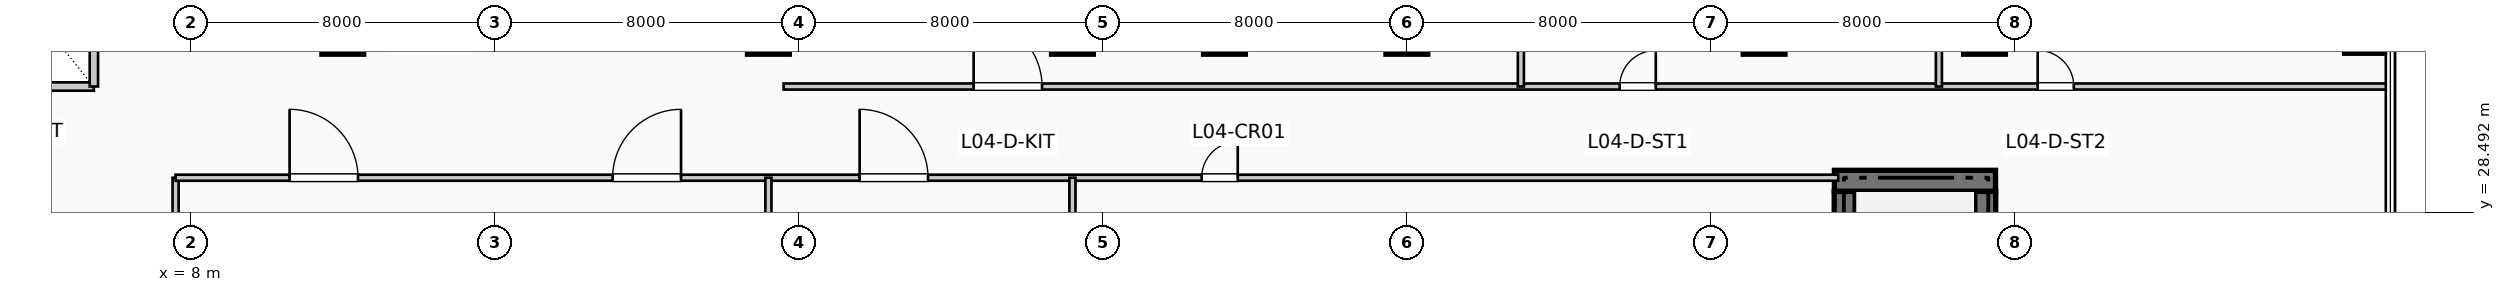
"""IFC4 building model, lengths in metres.
Left out: names, types, materials, properties, quantities, classifications, styles, units other than length and angle.
Written with IfcOpenShell. Run it as: python <this file> out.ifc"""

import sys

from ifc_helpers import new_model, si_unit, direction, frame, frame_2d, origin, origin_2d, place, context, subcontext, project, spatial, rectangle, extrude, element, fill, save


model = new_model("IFC4")
c1 = context("Model", 3, precision=1e-05, world=origin(), true_north=direction((0.0, 1.0)))
c2 = subcontext(c1, "Body", "Model", "MODEL_VIEW")
j1 = project(units=[si_unit("LENGTHUNIT", "METRE"), si_unit("PLANEANGLEUNIT", "RADIAN")], contexts=[c1])
p1 = place(None, origin())
s1 = spatial("IfcSite", under=j1, at=p1, CompositionType="ELEMENT")
p2 = place(p1, origin())
s2 = spatial("IfcBuilding", under=s1, at=p2, CompositionType="ELEMENT")
p3 = place(p2, frame((0.0, 0.0, 21.12)))
s3 = spatial("IfcBuildingStorey", under=s2, at=p3, CompositionType="ELEMENT", Elevation=21.12)
for number, where, z_axis, x_axis in (
    (1, (51.52, 21.15, 0.0), (0.0, 0.0, 1.0), (0.0, 1.0, 0.0)),
    (2, (55.22, 21.15, 0.0), (0.0, 0.0, 1.0), (0.0, 1.0, 0.0)),
):
    element("IfcWall", number, at=place(p3, frame(where, z_axis=z_axis, x_axis=x_axis)), inside=s3, PredefinedType="SHEAR", context=c2, shape_type="SweptSolid", body=[
        extrude(rectangle(XDim=7.89, YDim=0.55, at=frame_2d((3.945, 0.0))), origin(), (0.0, 0.0, 1.0), 4.62),
    ])
p4 = place(p3, frame((51.25, 29.32, 0.0), z_axis=(0.0, 0.0, 1.0), x_axis=(1.0, 0.0, 0.0)))
e3 = element("IfcWall", 3, at=p4, inside=s3, PredefinedType="SHEAR", context=c2, shape_type="SweptSolid", body=[
    extrude(rectangle(XDim=4.24, YDim=0.55, at=frame_2d((2.12, 0.0))), origin(), (0.0, 0.0, 1.0), 4.62),
])
for number, where, z_axis, x_axis in (
    (4, (12.0, 33.2, 0.0), (0.0, 0.0, 1.0), (1.0, 0.0, 0.0)),
    (5, (23.2, 33.2, 0.0), (0.0, 0.0, 1.0), (1.0, 0.0, 0.0)),
    (6, (31.2, 33.2, 0.0), (0.0, 0.0, 1.0), (1.0, 0.0, 0.0)),
    (7, (35.2, 33.2, 0.0), (0.0, 0.0, 1.0), (1.0, 0.0, 0.0)),
    (8, (40.0, 33.2, 0.0), (0.0, 0.0, 1.0), (1.0, 0.0, 0.0)),
    (9, (49.4, 33.2, 0.0), (0.0, 0.0, 1.0), (1.0, 0.0, 0.0)),
    (10, (55.2, 33.2, 0.0), (0.0, 0.0, 1.0), (1.0, 0.0, 0.0)),
):
    element("IfcColumn", number, at=place(p3, frame(where, z_axis=z_axis, x_axis=x_axis)), inside=s3, PredefinedType="COLUMN", context=c2, shape_type="SweptSolid", body=[
        extrude(rectangle(XDim=1.1, YDim=1.1, at=origin_2d()), origin(), (0.0, 0.0, 1.0), 4.62),
    ])
p5 = place(p3, frame((65.2, 33.2, 0.0), z_axis=(0.0, 0.0, 1.0), x_axis=(1.0, 0.0, 0.0)))
e11 = element("IfcColumn", 11, at=p5, inside=s3, PredefinedType="COLUMN", context=c2, shape_type="SweptSolid", body=[
    extrude(rectangle(XDim=1.05, YDim=1.05, at=origin_2d()), origin(), (0.0, 0.0, 1.0), 4.62),
])
p6 = place(p3, frame((1.55, 31.8, 0.0), z_axis=(0.0, 0.0, 1.0), x_axis=(1.0, 0.0, 0.0)))
e12 = element("IfcWall", 12, at=p6, inside=s3, PredefinedType="PARTITIONING", context=c2, shape_type="SweptSolid", body=[
    extrude(rectangle(XDim=3.9, YDim=0.22, at=frame_2d((1.95, 0.0))), origin(), (0.0, 0.0, 1.0), 4.2),
])
p7 = place(p3, frame((5.45, 31.8, 0.0), z_axis=(0.0, 0.0, 1.0), x_axis=(0.0, 1.0, 0.0)))
e13 = element("IfcWall", 13, at=p7, inside=s3, PredefinedType="PARTITIONING", context=c2, shape_type="SweptSolid", body=[
    extrude(rectangle(XDim=2.38, YDim=0.22, at=frame_2d((1.19, 0.0))), origin(), (0.0, 0.0, 1.0), 4.2),
])
p8 = place(p3, frame((7.6, -1.81, 0.0), z_axis=(0.0, 0.0, 1.0), x_axis=(0.0, 1.0, 0.0)))
e14 = element("IfcWall", 14, at=p8, inside=s3, PredefinedType="PARTITIONING", context=c2, shape_type="SweptSolid", body=[
    extrude(rectangle(XDim=31.21, YDim=0.16, at=frame_2d((15.605, 0.0))), origin(), (0.0, 0.0, 1.0), 2.42),
])
p9 = place(p3, frame((7.6, 29.4, 0.0), z_axis=(0.0, 0.0, 1.0), x_axis=(1.0, 0.0, 0.0)))
e15 = element("IfcWall", 15, at=p9, inside=s3, PredefinedType="PARTITIONING", context=c2, shape_type="SweptSolid", body=[
    extrude(rectangle(XDim=43.75, YDim=0.16, at=frame_2d((21.875, 0.0))), origin(), (0.0, 0.0, 1.0), 3.855),
])
p10 = place(p9, frame((3.0, 0.0, 0.0)))
e16 = element("IfcOpeningElement", 16, at=p10, cuts=e15, PredefinedType="OPENING", context=c2, shape_type="SweptSolid", body=[
    extrude(rectangle(XDim=1.8, YDim=2.3, at=frame_2d((0.9, 1.15))), frame((0.0, 0.09, 0.0), z_axis=(0.0, -1.0, 0.0), x_axis=(1.0, 0.0, 0.0)), (0.0, 0.0, 1.0), 0.18),
])
p11 = place(p9, frame((11.5, 0.0, 0.0)))
e17 = element("IfcOpeningElement", 17, at=p11, cuts=e15, PredefinedType="OPENING", context=c2, shape_type="SweptSolid", body=[
    extrude(rectangle(XDim=1.8, YDim=2.3, at=frame_2d((0.9, 1.15))), frame((0.0, 0.09, 0.0), z_axis=(0.0, -1.0, 0.0), x_axis=(1.0, 0.0, 0.0)), (0.0, 0.0, 1.0), 0.18),
])
p12 = place(p9, frame((18.0, 0.0, 0.0)))
e18 = element("IfcOpeningElement", 18, at=p12, cuts=e15, PredefinedType="OPENING", context=c2, shape_type="SweptSolid", body=[
    extrude(rectangle(XDim=1.8, YDim=2.3, at=frame_2d((0.9, 1.15))), frame((0.0, 0.09, 0.0), z_axis=(0.0, -1.0, 0.0), x_axis=(1.0, 0.0, 0.0)), (0.0, 0.0, 1.0), 0.18),
])
p13 = place(p9, frame((27.0, 0.0, 0.0)))
e19 = element("IfcOpeningElement", 19, at=p13, cuts=e15, PredefinedType="OPENING", context=c2, shape_type="SweptSolid", body=[
    extrude(rectangle(XDim=0.95, YDim=2.15, at=frame_2d((0.475, 1.075))), frame((0.0, 0.09, 0.0), z_axis=(0.0, -1.0, 0.0), x_axis=(1.0, 0.0, 0.0)), (0.0, 0.0, 1.0), 0.18),
])
p14 = place(p3, frame((23.2, -1.81, 0.0), z_axis=(0.0, 0.0, 1.0), x_axis=(0.0, 1.0, 0.0)))
e20 = element("IfcWall", 20, at=p14, inside=s3, PredefinedType="PARTITIONING", context=c2, shape_type="SweptSolid", body=[
    extrude(rectangle(XDim=31.21, YDim=0.16, at=frame_2d((15.605, 0.0))), origin(), (0.0, 0.0, 1.0), 3.385),
])
p15 = place(p3, frame((31.2, 16.19, 0.0), z_axis=(0.0, 0.0, 1.0), x_axis=(0.0, 1.0, 0.0)))
e21 = element("IfcWall", 21, at=p15, inside=s3, PredefinedType="PARTITIONING", context=c2, shape_type="SweptSolid", body=[
    extrude(rectangle(XDim=13.21, YDim=0.16, at=frame_2d((6.605, 0.0))), origin(), (0.0, 0.0, 1.0), 3.385),
])
p16 = place(p3, frame((23.6, 31.8, 0.0), z_axis=(0.0, 0.0, 1.0), x_axis=(1.0, 0.0, 0.0)))
e22 = element("IfcWall", 22, at=p16, inside=s3, PredefinedType="PARTITIONING", context=c2, shape_type="SweptSolid", body=[
    extrude(rectangle(XDim=42.21, YDim=0.16, at=frame_2d((21.105, 0.0))), origin(), (0.0, 0.0, 1.0), 4.2),
])
p17 = place(p16, frame((5.0, 0.0, 0.0)))
e23 = element("IfcOpeningElement", 23, at=p17, cuts=e22, PredefinedType="OPENING", context=c2, shape_type="SweptSolid", body=[
    extrude(rectangle(XDim=1.8, YDim=2.3, at=frame_2d((0.9, 1.15))), frame((0.0, 0.09, 0.0), z_axis=(0.0, -1.0, 0.0), x_axis=(1.0, 0.0, 0.0)), (0.0, 0.0, 1.0), 0.18),
])
p18 = place(p16, frame((22.0, 0.0, 0.0)))
e24 = element("IfcOpeningElement", 24, at=p18, cuts=e22, PredefinedType="OPENING", context=c2, shape_type="SweptSolid", body=[
    extrude(rectangle(XDim=0.95, YDim=2.1, at=frame_2d((0.475, 1.05))), frame((0.0, 0.09, 0.0), z_axis=(0.0, -1.0, 0.0), x_axis=(1.0, 0.0, 0.0)), (0.0, 0.0, 1.0), 0.18),
])
p19 = place(p16, frame((33.0, 0.0, 0.0)))
e25 = element("IfcOpeningElement", 25, at=p19, cuts=e22, PredefinedType="OPENING", context=c2, shape_type="SweptSolid", body=[
    extrude(rectangle(XDim=0.95, YDim=2.1, at=frame_2d((0.475, 1.05))), frame((0.0, 0.09, 0.0), z_axis=(0.0, -1.0, 0.0), x_axis=(1.0, 0.0, 0.0)), (0.0, 0.0, 1.0), 0.18),
])
for number, where, z_axis, x_axis in (
    (26, (43.0, 31.8, 0.0), (0.0, 0.0, 1.0), (0.0, 1.0, 0.0)),
    (27, (54.0, 31.8, 0.0), (0.0, 0.0, 1.0), (0.0, 1.0, 0.0)),
):
    element("IfcWall", number, at=place(p3, frame(where, z_axis=z_axis, x_axis=x_axis)), inside=s3, PredefinedType="PARTITIONING", context=c2, shape_type="SweptSolid", body=[
        extrude(rectangle(XDim=16.01, YDim=0.16, at=frame_2d((8.005, 0.0))), origin(), (0.0, 0.0, 1.0), 4.2),
    ])
p20 = place(p10, origin())
e28 = element("IfcDoor", 28, at=p20, inside=s3, OperationType="SINGLE_SWING_LEFT", PredefinedType="DOOR", context=c2, shape_type="SweptSolid", body=[
    extrude(rectangle(XDim=1.8, YDim=2.3, at=frame_2d((0.9, 1.15))), frame((0.0, 0.025, 0.0), z_axis=(0.0, -1.0, 0.0), x_axis=(1.0, 0.0, 0.0)), (0.0, 0.0, 1.0), 0.05),
])
fill(e16, e28)
p21 = place(p11, origin())
e29 = element("IfcDoor", 29, at=p21, inside=s3, OperationType="SINGLE_SWING_RIGHT", PredefinedType="DOOR", context=c2, shape_type="SweptSolid", body=[
    extrude(rectangle(XDim=1.8, YDim=2.3, at=frame_2d((0.9, 1.15))), frame((0.0, 0.025, 0.0), z_axis=(0.0, -1.0, 0.0), x_axis=(1.0, 0.0, 0.0)), (0.0, 0.0, 1.0), 0.05),
])
fill(e17, e29)
p22 = place(p12, origin())
e30 = element("IfcDoor", 30, at=p22, inside=s3, OperationType="SINGLE_SWING_LEFT", PredefinedType="DOOR", context=c2, shape_type="SweptSolid", body=[
    extrude(rectangle(XDim=1.8, YDim=2.3, at=frame_2d((0.9, 1.15))), frame((0.0, 0.025, 0.0), z_axis=(0.0, -1.0, 0.0), x_axis=(1.0, 0.0, 0.0)), (0.0, 0.0, 1.0), 0.05),
])
fill(e18, e30)
p23 = place(p13, origin())
e31 = element("IfcDoor", 31, at=p23, inside=s3, OperationType="SINGLE_SWING_RIGHT", PredefinedType="DOOR", context=c2, shape_type="SweptSolid", body=[
    extrude(rectangle(XDim=0.95, YDim=2.15, at=frame_2d((0.475, 1.075))), frame((0.0, 0.025, 0.0), z_axis=(0.0, -1.0, 0.0), x_axis=(1.0, 0.0, 0.0)), (0.0, 0.0, 1.0), 0.05),
])
fill(e19, e31)
p24 = place(p17, origin())
e32 = element("IfcDoor", 32, at=p24, inside=s3, OperationType="SINGLE_SWING_LEFT", PredefinedType="DOOR", context=c2, shape_type="SweptSolid", body=[
    extrude(rectangle(XDim=1.8, YDim=2.3, at=frame_2d((0.9, 1.15))), frame((0.0, 0.025, 0.0), z_axis=(0.0, -1.0, 0.0), x_axis=(1.0, 0.0, 0.0)), (0.0, 0.0, 1.0), 0.05),
])
fill(e23, e32)
p25 = place(p18, origin())
e33 = element("IfcDoor", 33, at=p25, inside=s3, OperationType="SINGLE_SWING_RIGHT", PredefinedType="DOOR", context=c2, shape_type="SweptSolid", body=[
    extrude(rectangle(XDim=0.95, YDim=2.1, at=frame_2d((0.475, 1.05))), frame((0.0, 0.025, 0.0), z_axis=(0.0, -1.0, 0.0), x_axis=(1.0, 0.0, 0.0)), (0.0, 0.0, 1.0), 0.05),
])
fill(e24, e33)
p26 = place(p19, origin())
e34 = element("IfcDoor", 34, at=p26, inside=s3, OperationType="SINGLE_SWING_LEFT", PredefinedType="DOOR", context=c2, shape_type="SweptSolid", body=[
    extrude(rectangle(XDim=0.95, YDim=2.1, at=frame_2d((0.475, 1.05))), frame((0.0, 0.025, 0.0), z_axis=(0.0, -1.0, 0.0), x_axis=(1.0, 0.0, 0.0)), (0.0, 0.0, 1.0), 0.05),
])
fill(e25, e34)
save(model, sys.argv[1])
